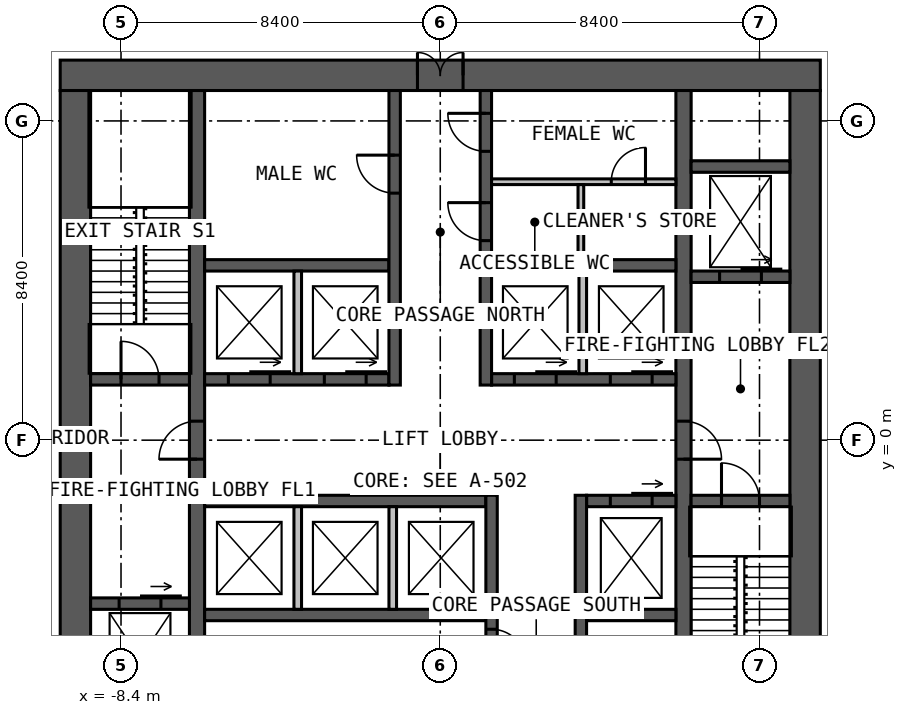
"""IFC4 building model, lengths in metres.
Left out: names, types, materials, properties, quantities, classifications, styles, units other than length and angle.
Written with IfcOpenShell. Run it as: python <this file> out.ifc"""

import sys

from ifc_helpers import new_model, si_unit, direction, frame, frame_2d, origin, place, context, subcontext, project, spatial, rectangle, extrude, element, fill, save


model = new_model("IFC4")
c1 = context("Model", 3, precision=1e-05, world=origin(), true_north=direction((0.0, 1.0)))
c2 = subcontext(c1, "Body", "Model", "MODEL_VIEW")
j1 = project(units=[si_unit("LENGTHUNIT", "METRE"), si_unit("PLANEANGLEUNIT", "RADIAN")], contexts=[c1])
p1 = place(None, origin())
s1 = spatial("IfcSite", under=j1, at=p1, CompositionType="ELEMENT")
p2 = place(p1, origin())
s2 = spatial("IfcBuilding", under=s1, at=p2, CompositionType="ELEMENT")
p3 = place(p2, frame((0.0, 0.0, 33.0)))
s3 = spatial("IfcBuildingStorey", under=s2, at=p3, CompositionType="ELEMENT", Elevation=33.0)
p4 = place(p3, frame((-10.0, 9.6, 0.0), z_axis=(0.0, 0.0, 1.0), x_axis=(1.0, 0.0, 0.0)))
e1 = element("IfcWall", 1, at=p4, inside=s3, PredefinedType="SOLIDWALL", context=c2, shape_type="SweptSolid", body=[
    extrude(rectangle(XDim=20.0, YDim=0.8, at=frame_2d((10.0, 0.0))), origin(), (0.0, 0.0, 1.0), 4.0),
])
p5 = place(p4, frame((9.4, 0.0, 0.0)))
e2 = element("IfcOpeningElement", 2, at=p5, cuts=e1, PredefinedType="OPENING", context=c2, shape_type="SweptSolid", body=[
    extrude(rectangle(XDim=1.2, YDim=2.2, at=frame_2d((0.6, 1.1))), frame((0.0, 0.41, 0.0), z_axis=(0.0, -1.0, 0.0), x_axis=(1.0, 0.0, 0.0)), (0.0, 0.0, 1.0), 0.82),
])
for number, where, z_axis, x_axis in (
    (3, (9.6, -9.2, 0.0), (0.0, 0.0, 1.0), (0.0, 1.0, 0.0)),
    (4, (-9.6, 9.2, 0.0), (0.0, 0.0, 1.0), (0.0, -1.0, 0.0)),
):
    element("IfcWall", number, at=place(p3, frame(where, z_axis=z_axis, x_axis=x_axis)), inside=s3, PredefinedType="SOLIDWALL", context=c2, shape_type="SweptSolid", body=[
        extrude(rectangle(XDim=18.4, YDim=0.8, at=frame_2d((9.2, 0.0))), origin(), (0.0, 0.0, 1.0), 4.0),
    ])
p6 = place(p3, frame((-6.4, -9.2, 0.0), z_axis=(0.0, 0.0, 1.0), x_axis=(0.0, 1.0, 0.0)))
e5 = element("IfcWall", 5, at=p6, inside=s3, PredefinedType="SOLIDWALL", context=c2, shape_type="SweptSolid", body=[
    extrude(rectangle(XDim=18.4, YDim=0.4, at=frame_2d((9.2, 0.0))), origin(), (0.0, 0.0, 1.0), 4.0),
])
p7 = place(p6, frame((8.7, 0.0, 0.0)))
e6 = element("IfcOpeningElement", 6, at=p7, cuts=e5, PredefinedType="OPENING", context=c2, shape_type="SweptSolid", body=[
    extrude(rectangle(XDim=1.0, YDim=2.2, at=frame_2d((0.5, 1.1))), frame((0.0, 0.21, 0.0), z_axis=(0.0, -1.0, 0.0), x_axis=(1.0, 0.0, 0.0)), (0.0, 0.0, 1.0), 0.42),
])
p8 = place(p3, frame((6.4, 9.2, 0.0), z_axis=(0.0, 0.0, 1.0), x_axis=(0.0, -1.0, 0.0)))
e7 = element("IfcWall", 7, at=p8, inside=s3, PredefinedType="SOLIDWALL", context=c2, shape_type="SweptSolid", body=[
    extrude(rectangle(XDim=18.4, YDim=0.4, at=frame_2d((9.2, 0.0))), origin(), (0.0, 0.0, 1.0), 4.0),
])
p9 = place(p8, frame((8.7, 0.0, 0.0)))
e8 = element("IfcOpeningElement", 8, at=p9, cuts=e7, PredefinedType="OPENING", context=c2, shape_type="SweptSolid", body=[
    extrude(rectangle(XDim=1.0, YDim=2.2, at=frame_2d((0.5, 1.1))), frame((0.0, 0.21, 0.0), z_axis=(0.0, -1.0, 0.0), x_axis=(1.0, 0.0, 0.0)), (0.0, 0.0, 1.0), 0.42),
])
p10 = place(p3, frame((-6.2, 1.6, 0.0), z_axis=(0.0, 0.0, 1.0), x_axis=(1.0, 0.0, 0.0)))
e9 = element("IfcWall", 9, at=p10, inside=s3, PredefinedType="SOLIDWALL", context=c2, shape_type="SweptSolid", body=[
    extrude(rectangle(XDim=4.85, YDim=0.3, at=frame_2d((2.425, 0.0))), origin(), (0.0, 0.0, 1.0), 4.0),
])
p11 = place(p10, frame((0.625, 0.0, 0.0)))
e10 = element("IfcOpeningElement", 10, at=p11, cuts=e9, PredefinedType="OPENING", context=c2, shape_type="SweptSolid", body=[
    extrude(rectangle(XDim=1.1, YDim=2.2, at=frame_2d((0.55, 1.1))), frame((0.0, 0.16, 0.0), z_axis=(0.0, -1.0, 0.0), x_axis=(1.0, 0.0, 0.0)), (0.0, 0.0, 1.0), 0.32),
])
p12 = place(p10, frame((3.15, 0.0, 0.0)))
e11 = element("IfcOpeningElement", 11, at=p12, cuts=e9, PredefinedType="OPENING", context=c2, shape_type="SweptSolid", body=[
    extrude(rectangle(XDim=1.1, YDim=2.2, at=frame_2d((0.55, 1.1))), frame((0.0, 0.16, 0.0), z_axis=(0.0, -1.0, 0.0), x_axis=(1.0, 0.0, 0.0)), (0.0, 0.0, 1.0), 0.32),
])
p13 = place(p3, frame((1.35, 1.6, 0.0), z_axis=(0.0, 0.0, 1.0), x_axis=(1.0, 0.0, 0.0)))
e12 = element("IfcWall", 12, at=p13, inside=s3, PredefinedType="SOLIDWALL", context=c2, shape_type="SweptSolid", body=[
    extrude(rectangle(XDim=4.85, YDim=0.3, at=frame_2d((2.425, 0.0))), origin(), (0.0, 0.0, 1.0), 4.0),
])
p14 = place(p13, frame((0.6, 0.0, 0.0)))
e13 = element("IfcOpeningElement", 13, at=p14, cuts=e12, PredefinedType="OPENING", context=c2, shape_type="SweptSolid", body=[
    extrude(rectangle(XDim=1.1, YDim=2.2, at=frame_2d((0.55, 1.1))), frame((0.0, 0.16, 0.0), z_axis=(0.0, -1.0, 0.0), x_axis=(1.0, 0.0, 0.0)), (0.0, 0.0, 1.0), 0.32),
])
p15 = place(p13, frame((3.125, 0.0, 0.0)))
e14 = element("IfcOpeningElement", 14, at=p15, cuts=e12, PredefinedType="OPENING", context=c2, shape_type="SweptSolid", body=[
    extrude(rectangle(XDim=1.1, YDim=2.2, at=frame_2d((0.55, 1.1))), frame((0.0, 0.16, 0.0), z_axis=(0.0, -1.0, 0.0), x_axis=(1.0, 0.0, 0.0)), (0.0, 0.0, 1.0), 0.32),
])
for number, where, z_axis, x_axis in (
    (15, (-6.2, 4.6, 0.0), (0.0, 0.0, 1.0), (1.0, 0.0, 0.0)),
    (16, (1.35, 4.6, 0.0), (0.0, 0.0, 1.0), (1.0, 0.0, 0.0)),
):
    element("IfcWall", number, at=place(p3, frame(where, z_axis=z_axis, x_axis=x_axis)), inside=s3, PredefinedType="SOLIDWALL", context=c2, shape_type="SweptSolid", body=[
        extrude(rectangle(XDim=4.85, YDim=0.3, at=frame_2d((2.425, 0.0))), origin(), (0.0, 0.0, 1.0), 4.0),
    ])
p16 = place(p3, frame((-1.2, 1.45, 0.0), z_axis=(0.0, 0.0, 1.0), x_axis=(0.0, 1.0, 0.0)))
e17 = element("IfcWall", 17, at=p16, inside=s3, PredefinedType="SOLIDWALL", context=c2, shape_type="SweptSolid", body=[
    extrude(rectangle(XDim=7.75, YDim=0.3, at=frame_2d((3.875, 0.0))), origin(), (0.0, 0.0, 1.0), 4.0),
])
p17 = place(p16, frame((5.05, 0.0, 0.0)))
e18 = element("IfcOpeningElement", 18, at=p17, cuts=e17, PredefinedType="OPENING", context=c2, shape_type="SweptSolid", body=[
    extrude(rectangle(XDim=1.0, YDim=2.2, at=frame_2d((0.5, 1.1))), frame((0.0, 0.16, 0.0), z_axis=(0.0, -1.0, 0.0), x_axis=(1.0, 0.0, 0.0)), (0.0, 0.0, 1.0), 0.32),
])
p18 = place(p3, frame((1.2, 1.45, 0.0), z_axis=(0.0, 0.0, 1.0), x_axis=(0.0, 1.0, 0.0)))
e19 = element("IfcWall", 19, at=p18, inside=s3, PredefinedType="SOLIDWALL", context=c2, shape_type="SweptSolid", body=[
    extrude(rectangle(XDim=7.75, YDim=0.3, at=frame_2d((3.875, 0.0))), origin(), (0.0, 0.0, 1.0), 4.0),
])
p19 = place(p18, frame((3.8, 0.0, 0.0)))
e20 = element("IfcOpeningElement", 20, at=p19, cuts=e19, PredefinedType="OPENING", context=c2, shape_type="SweptSolid", body=[
    extrude(rectangle(XDim=1.0, YDim=2.2, at=frame_2d((0.5, 1.1))), frame((0.0, 0.16, 0.0), z_axis=(0.0, -1.0, 0.0), x_axis=(1.0, 0.0, 0.0)), (0.0, 0.0, 1.0), 0.32),
])
p20 = place(p18, frame((6.15, 0.0, 0.0)))
e21 = element("IfcOpeningElement", 21, at=p20, cuts=e19, PredefinedType="OPENING", context=c2, shape_type="SweptSolid", body=[
    extrude(rectangle(XDim=1.0, YDim=2.2, at=frame_2d((0.5, 1.1))), frame((0.0, 0.16, 0.0), z_axis=(0.0, -1.0, 0.0), x_axis=(1.0, 0.0, 0.0)), (0.0, 0.0, 1.0), 0.32),
])
p21 = place(p3, frame((-6.2, -1.6, 0.0), z_axis=(0.0, 0.0, 1.0), x_axis=(1.0, 0.0, 0.0)))
e22 = element("IfcWall", 22, at=p21, inside=s3, PredefinedType="SOLIDWALL", context=c2, shape_type="SweptSolid", body=[
    extrude(rectangle(XDim=7.4, YDim=0.3, at=frame_2d((3.7, 0.0))), origin(), (0.0, 0.0, 1.0), 4.0),
])
p22 = place(p3, frame((3.85, -1.6, 0.0), z_axis=(0.0, 0.0, 1.0), x_axis=(1.0, 0.0, 0.0)))
e23 = element("IfcWall", 23, at=p22, inside=s3, PredefinedType="SOLIDWALL", context=c2, shape_type="SweptSolid", body=[
    extrude(rectangle(XDim=2.35, YDim=0.3, at=frame_2d((1.175, 0.0))), origin(), (0.0, 0.0, 1.0), 4.0),
])
p23 = place(p22, frame((0.625, 0.0, 0.0)))
e24 = element("IfcOpeningElement", 24, at=p23, cuts=e23, PredefinedType="OPENING", context=c2, shape_type="SweptSolid", body=[
    extrude(rectangle(XDim=1.1, YDim=2.2, at=frame_2d((0.55, 1.1))), frame((0.0, 0.16, 0.0), z_axis=(0.0, -1.0, 0.0), x_axis=(1.0, 0.0, 0.0)), (0.0, 0.0, 1.0), 0.32),
])
p24 = place(p3, frame((-6.2, -4.6, 0.0), z_axis=(0.0, 0.0, 1.0), x_axis=(1.0, 0.0, 0.0)))
e25 = element("IfcWall", 25, at=p24, inside=s3, PredefinedType="SOLIDWALL", context=c2, shape_type="SweptSolid", body=[
    extrude(rectangle(XDim=7.4, YDim=0.3, at=frame_2d((3.7, 0.0))), origin(), (0.0, 0.0, 1.0), 4.0),
])
p25 = place(p3, frame((3.85, -4.6, 0.0), z_axis=(0.0, 0.0, 1.0), x_axis=(1.0, 0.0, 0.0)))
e26 = element("IfcWall", 26, at=p25, inside=s3, PredefinedType="SOLIDWALL", context=c2, shape_type="SweptSolid", body=[
    extrude(rectangle(XDim=2.35, YDim=0.3, at=frame_2d((1.175, 0.0))), origin(), (0.0, 0.0, 1.0), 4.0),
])
p26 = place(p3, frame((1.35, -1.45, 0.0), z_axis=(0.0, 0.0, 1.0), x_axis=(0.0, -1.0, 0.0)))
e27 = element("IfcWall", 27, at=p26, inside=s3, PredefinedType="SOLIDWALL", context=c2, shape_type="SweptSolid", body=[
    extrude(rectangle(XDim=7.75, YDim=0.3, at=frame_2d((3.875, 0.0))), origin(), (0.0, 0.0, 1.0), 4.0),
])
p27 = place(p26, frame((5.8, 0.0, 0.0)))
e28 = element("IfcOpeningElement", 28, at=p27, cuts=e27, PredefinedType="OPENING", context=c2, shape_type="SweptSolid", body=[
    extrude(rectangle(XDim=1.0, YDim=2.2, at=frame_2d((0.5, 1.1))), frame((0.0, 0.16, 0.0), z_axis=(0.0, -1.0, 0.0), x_axis=(1.0, 0.0, 0.0)), (0.0, 0.0, 1.0), 0.32),
])
p28 = place(p26, frame((3.525, 0.0, 0.0)))
e29 = element("IfcOpeningElement", 29, at=p28, cuts=e27, PredefinedType="OPENING", context=c2, shape_type="SweptSolid", body=[
    extrude(rectangle(XDim=0.9, YDim=2.2, at=frame_2d((0.45, 1.1))), frame((0.0, 0.16, 0.0), z_axis=(0.0, -1.0, 0.0), x_axis=(1.0, 0.0, 0.0)), (0.0, 0.0, 1.0), 0.32),
])
p29 = place(p3, frame((3.7, -1.45, 0.0), z_axis=(0.0, 0.0, 1.0), x_axis=(0.0, -1.0, 0.0)))
e30 = element("IfcWall", 30, at=p29, inside=s3, PredefinedType="SOLIDWALL", context=c2, shape_type="SweptSolid", body=[
    extrude(rectangle(XDim=7.75, YDim=0.3, at=frame_2d((3.875, 0.0))), origin(), (0.0, 0.0, 1.0), 4.0),
])
p30 = place(p29, frame((5.1, 0.0, 0.0)))
e31 = element("IfcOpeningElement", 31, at=p30, cuts=e30, PredefinedType="OPENING", context=c2, shape_type="SweptSolid", body=[
    extrude(rectangle(XDim=0.9, YDim=2.2, at=frame_2d((0.45, 1.1))), frame((0.0, 0.16, 0.0), z_axis=(0.0, -1.0, 0.0), x_axis=(1.0, 0.0, 0.0)), (0.0, 0.0, 1.0), 0.32),
])
p31 = place(p3, frame((-9.2, 1.6, 0.0), z_axis=(0.0, 0.0, 1.0), x_axis=(1.0, 0.0, 0.0)))
e32 = element("IfcWall", 32, at=p31, inside=s3, PredefinedType="SOLIDWALL", context=c2, shape_type="SweptSolid", body=[
    extrude(rectangle(XDim=2.6, YDim=0.3, at=frame_2d((1.3, 0.0))), origin(), (0.0, 0.0, 1.0), 4.0),
])
p32 = place(p31, frame((0.8, 0.0, 0.0)))
e33 = element("IfcOpeningElement", 33, at=p32, cuts=e32, PredefinedType="OPENING", context=c2, shape_type="SweptSolid", body=[
    extrude(rectangle(XDim=1.0, YDim=2.2, at=frame_2d((0.5, 1.1))), frame((0.0, 0.16, 0.0), z_axis=(0.0, -1.0, 0.0), x_axis=(1.0, 0.0, 0.0)), (0.0, 0.0, 1.0), 0.32),
])
p33 = place(p3, frame((6.6, -1.6, 0.0), z_axis=(0.0, 0.0, 1.0), x_axis=(1.0, 0.0, 0.0)))
e34 = element("IfcWall", 34, at=p33, inside=s3, PredefinedType="SOLIDWALL", context=c2, shape_type="SweptSolid", body=[
    extrude(rectangle(XDim=2.6, YDim=0.3, at=frame_2d((1.3, 0.0))), origin(), (0.0, 0.0, 1.0), 4.0),
])
p34 = place(p33, frame((0.8, 0.0, 0.0)))
e35 = element("IfcOpeningElement", 35, at=p34, cuts=e34, PredefinedType="OPENING", context=c2, shape_type="SweptSolid", body=[
    extrude(rectangle(XDim=1.0, YDim=2.2, at=frame_2d((0.5, 1.1))), frame((0.0, 0.16, 0.0), z_axis=(0.0, -1.0, 0.0), x_axis=(1.0, 0.0, 0.0)), (0.0, 0.0, 1.0), 0.32),
])
p35 = place(p3, frame((-9.2, -4.3, 0.0), z_axis=(0.0, 0.0, 1.0), x_axis=(1.0, 0.0, 0.0)))
e36 = element("IfcWall", 36, at=p35, inside=s3, PredefinedType="SOLIDWALL", context=c2, shape_type="SweptSolid", body=[
    extrude(rectangle(XDim=2.6, YDim=0.3, at=frame_2d((1.3, 0.0))), origin(), (0.0, 0.0, 1.0), 4.0),
])
p36 = place(p35, frame((0.75, 0.0, 0.0)))
e37 = element("IfcOpeningElement", 37, at=p36, cuts=e36, PredefinedType="OPENING", context=c2, shape_type="SweptSolid", body=[
    extrude(rectangle(XDim=1.1, YDim=2.2, at=frame_2d((0.55, 1.1))), frame((0.0, 0.16, 0.0), z_axis=(0.0, -1.0, 0.0), x_axis=(1.0, 0.0, 0.0)), (0.0, 0.0, 1.0), 0.32),
])
p37 = place(p3, frame((6.6, 4.3, 0.0), z_axis=(0.0, 0.0, 1.0), x_axis=(1.0, 0.0, 0.0)))
e38 = element("IfcWall", 38, at=p37, inside=s3, PredefinedType="SOLIDWALL", context=c2, shape_type="SweptSolid", body=[
    extrude(rectangle(XDim=2.6, YDim=0.3, at=frame_2d((1.3, 0.0))), origin(), (0.0, 0.0, 1.0), 4.0),
])
p38 = place(p37, frame((0.75, 0.0, 0.0)))
e39 = element("IfcOpeningElement", 39, at=p38, cuts=e38, PredefinedType="OPENING", context=c2, shape_type="SweptSolid", body=[
    extrude(rectangle(XDim=1.1, YDim=2.2, at=frame_2d((0.55, 1.1))), frame((0.0, 0.16, 0.0), z_axis=(0.0, -1.0, 0.0), x_axis=(1.0, 0.0, 0.0)), (0.0, 0.0, 1.0), 0.32),
])
p39 = place(p3, frame((6.6, 7.2, 0.0), z_axis=(0.0, 0.0, 1.0), x_axis=(1.0, 0.0, 0.0)))
e40 = element("IfcWall", 40, at=p39, inside=s3, PredefinedType="SOLIDWALL", context=c2, shape_type="SweptSolid", body=[
    extrude(rectangle(XDim=2.6, YDim=0.3, at=frame_2d((1.3, 0.0))), origin(), (0.0, 0.0, 1.0), 4.0),
])
for number, where, z_axis, x_axis in (
    (41, (-3.75, 1.75, 0.0), (0.0, 0.0, 1.0), (0.0, 1.0, 0.0)),
    (42, (3.75, 1.75, 0.0), (0.0, 0.0, 1.0), (0.0, 1.0, 0.0)),
    (43, (-3.75, -1.75, 0.0), (0.0, 0.0, 1.0), (0.0, -1.0, 0.0)),
    (44, (-1.25, -1.75, 0.0), (0.0, 0.0, 1.0), (0.0, -1.0, 0.0)),
):
    element("IfcWall", number, at=place(p3, frame(where, z_axis=z_axis, x_axis=x_axis)), inside=s3, PredefinedType="SOLIDWALL", context=c2, shape_type="SweptSolid", body=[
        extrude(rectangle(XDim=2.7, YDim=0.2, at=frame_2d((1.35, 0.0))), origin(), (0.0, 0.0, 1.0), 3.75),
    ])
p40 = place(p3, frame((1.35, 6.8, 0.0), z_axis=(0.0, 0.0, 1.0), x_axis=(1.0, 0.0, 0.0)))
e45 = element("IfcWall", 45, at=p40, inside=s3, PredefinedType="PARTITIONING", context=c2, shape_type="SweptSolid", body=[
    extrude(rectangle(XDim=4.85, YDim=0.15, at=frame_2d((2.425, 0.0))), origin(), (0.0, 0.0, 1.0), 3.75),
])
p41 = place(p40, frame((3.15, 0.0, 0.0)))
e46 = element("IfcOpeningElement", 46, at=p41, cuts=e45, PredefinedType="OPENING", context=c2, shape_type="SweptSolid", body=[
    extrude(rectangle(XDim=0.9, YDim=2.2, at=frame_2d((0.45, 1.1))), frame((0.0, 0.085, 0.0), z_axis=(0.0, -1.0, 0.0), x_axis=(1.0, 0.0, 0.0)), (0.0, 0.0, 1.0), 0.17),
])
p42 = place(p3, frame((3.7, 4.75, 0.0), z_axis=(0.0, 0.0, 1.0), x_axis=(0.0, 1.0, 0.0)))
e47 = element("IfcWall", 47, at=p42, inside=s3, PredefinedType="PARTITIONING", context=c2, shape_type="SweptSolid", body=[
    extrude(rectangle(XDim=1.975, YDim=0.15, at=frame_2d((0.988, 0.0))), origin(), (0.0, 0.0, 1.0), 3.75),
])
p43 = place(p5, origin())
e48 = element("IfcDoor", 48, at=p43, inside=s3, OperationType="DOUBLE_DOOR_SINGLE_SWING", PredefinedType="DOOR", context=c2, shape_type="SweptSolid", body=[
    extrude(rectangle(XDim=1.2, YDim=2.2, at=frame_2d((0.6, 1.1))), frame((0.0, 0.025, 0.0), z_axis=(0.0, -1.0, 0.0), x_axis=(1.0, 0.0, 0.0)), (0.0, 0.0, 1.0), 0.05),
])
fill(e2, e48)
p44 = place(p7, origin())
e49 = element("IfcDoor", 49, at=p44, inside=s3, OperationType="SINGLE_SWING_LEFT", PredefinedType="DOOR", context=c2, shape_type="SweptSolid", body=[
    extrude(rectangle(XDim=1.0, YDim=2.2, at=frame_2d((0.5, 1.1))), frame((0.0, 0.025, 0.0), z_axis=(0.0, -1.0, 0.0), x_axis=(1.0, 0.0, 0.0)), (0.0, 0.0, 1.0), 0.05),
])
fill(e6, e49)
p45 = place(p9, origin())
e50 = element("IfcDoor", 50, at=p45, inside=s3, OperationType="SINGLE_SWING_RIGHT", PredefinedType="DOOR", context=c2, shape_type="SweptSolid", body=[
    extrude(rectangle(XDim=1.0, YDim=2.2, at=frame_2d((0.5, 1.1))), frame((0.0, 0.025, 0.0), z_axis=(0.0, -1.0, 0.0), x_axis=(1.0, 0.0, 0.0)), (0.0, 0.0, 1.0), 0.05),
])
fill(e8, e50)
p46 = place(p32, origin())
e51 = element("IfcDoor", 51, at=p46, inside=s3, OperationType="SINGLE_SWING_LEFT", PredefinedType="DOOR", context=c2, shape_type="SweptSolid", body=[
    extrude(rectangle(XDim=1.0, YDim=2.2, at=frame_2d((0.5, 1.1))), frame((0.0, 0.025, 0.0), z_axis=(0.0, -1.0, 0.0), x_axis=(1.0, 0.0, 0.0)), (0.0, 0.0, 1.0), 0.05),
])
fill(e33, e51)
p47 = place(p34, origin())
e52 = element("IfcDoor", 52, at=p47, inside=s3, OperationType="SINGLE_SWING_LEFT", PredefinedType="DOOR", context=c2, shape_type="SweptSolid", body=[
    extrude(rectangle(XDim=1.0, YDim=2.2, at=frame_2d((0.5, 1.1))), frame((0.0, 0.025, 0.0), z_axis=(0.0, -1.0, 0.0), x_axis=(1.0, 0.0, 0.0)), (0.0, 0.0, 1.0), 0.05),
])
fill(e35, e52)
p48 = place(p17, origin())
e53 = element("IfcDoor", 53, at=p48, inside=s3, OperationType="SINGLE_SWING_RIGHT", PredefinedType="DOOR", context=c2, shape_type="SweptSolid", body=[
    extrude(rectangle(XDim=1.0, YDim=2.2, at=frame_2d((0.5, 1.1))), frame((0.0, 0.025, 0.0), z_axis=(0.0, -1.0, 0.0), x_axis=(1.0, 0.0, 0.0)), (0.0, 0.0, 1.0), 0.05),
])
fill(e18, e53)
p49 = place(p19, origin())
e54 = element("IfcDoor", 54, at=p49, inside=s3, OperationType="SINGLE_SWING_RIGHT", PredefinedType="DOOR", context=c2, shape_type="SweptSolid", body=[
    extrude(rectangle(XDim=1.0, YDim=2.2, at=frame_2d((0.5, 1.1))), frame((0.0, 0.025, 0.0), z_axis=(0.0, -1.0, 0.0), x_axis=(1.0, 0.0, 0.0)), (0.0, 0.0, 1.0), 0.05),
])
fill(e20, e54)
p50 = place(p20, origin())
e55 = element("IfcDoor", 55, at=p50, inside=s3, OperationType="SINGLE_SWING_RIGHT", PredefinedType="DOOR", context=c2, shape_type="SweptSolid", body=[
    extrude(rectangle(XDim=1.0, YDim=2.2, at=frame_2d((0.5, 1.1))), frame((0.0, 0.025, 0.0), z_axis=(0.0, -1.0, 0.0), x_axis=(1.0, 0.0, 0.0)), (0.0, 0.0, 1.0), 0.05),
])
fill(e21, e55)
p51 = place(p28, origin())
e56 = element("IfcDoor", 56, at=p51, inside=s3, OperationType="SINGLE_SWING_RIGHT", PredefinedType="DOOR", context=c2, shape_type="SweptSolid", body=[
    extrude(rectangle(XDim=0.9, YDim=2.2, at=frame_2d((0.45, 1.1))), frame((0.0, 0.025, 0.0), z_axis=(0.0, -1.0, 0.0), x_axis=(1.0, 0.0, 0.0)), (0.0, 0.0, 1.0), 0.05),
])
fill(e29, e56)
p52 = place(p41, origin())
e57 = element("IfcDoor", 57, at=p52, inside=s3, OperationType="SINGLE_SWING_RIGHT", PredefinedType="DOOR", context=c2, shape_type="SweptSolid", body=[
    extrude(rectangle(XDim=0.9, YDim=2.2, at=frame_2d((0.45, 1.1))), frame((0.0, 0.025, 0.0), z_axis=(0.0, -1.0, 0.0), x_axis=(1.0, 0.0, 0.0)), (0.0, 0.0, 1.0), 0.05),
])
fill(e46, e57)
p53 = place(p11, origin())
e58 = element("IfcDoor", 58, at=p53, inside=s3, OperationType="SLIDING_TO_LEFT", PredefinedType="DOOR", context=c2, shape_type="SweptSolid", body=[
    extrude(rectangle(XDim=1.1, YDim=2.2, at=frame_2d((0.55, 1.1))), frame((0.0, 0.025, 0.0), z_axis=(0.0, -1.0, 0.0), x_axis=(1.0, 0.0, 0.0)), (0.0, 0.0, 1.0), 0.05),
])
fill(e10, e58)
p54 = place(p12, origin())
e59 = element("IfcDoor", 59, at=p54, inside=s3, OperationType="SLIDING_TO_LEFT", PredefinedType="DOOR", context=c2, shape_type="SweptSolid", body=[
    extrude(rectangle(XDim=1.1, YDim=2.2, at=frame_2d((0.55, 1.1))), frame((0.0, 0.025, 0.0), z_axis=(0.0, -1.0, 0.0), x_axis=(1.0, 0.0, 0.0)), (0.0, 0.0, 1.0), 0.05),
])
fill(e11, e59)
p55 = place(p14, origin())
e60 = element("IfcDoor", 60, at=p55, inside=s3, OperationType="SLIDING_TO_LEFT", PredefinedType="DOOR", context=c2, shape_type="SweptSolid", body=[
    extrude(rectangle(XDim=1.1, YDim=2.2, at=frame_2d((0.55, 1.1))), frame((0.0, 0.025, 0.0), z_axis=(0.0, -1.0, 0.0), x_axis=(1.0, 0.0, 0.0)), (0.0, 0.0, 1.0), 0.05),
])
fill(e13, e60)
p56 = place(p15, origin())
e61 = element("IfcDoor", 61, at=p56, inside=s3, OperationType="SLIDING_TO_LEFT", PredefinedType="DOOR", context=c2, shape_type="SweptSolid", body=[
    extrude(rectangle(XDim=1.1, YDim=2.2, at=frame_2d((0.55, 1.1))), frame((0.0, 0.025, 0.0), z_axis=(0.0, -1.0, 0.0), x_axis=(1.0, 0.0, 0.0)), (0.0, 0.0, 1.0), 0.05),
])
fill(e14, e61)
p57 = place(p23, origin())
e62 = element("IfcDoor", 62, at=p57, inside=s3, OperationType="SLIDING_TO_LEFT", PredefinedType="DOOR", context=c2, shape_type="SweptSolid", body=[
    extrude(rectangle(XDim=1.1, YDim=2.2, at=frame_2d((0.55, 1.1))), frame((0.0, 0.025, 0.0), z_axis=(0.0, -1.0, 0.0), x_axis=(1.0, 0.0, 0.0)), (0.0, 0.0, 1.0), 0.05),
])
fill(e24, e62)
p58 = place(p36, origin())
e63 = element("IfcDoor", 63, at=p58, inside=s3, OperationType="SLIDING_TO_LEFT", PredefinedType="DOOR", context=c2, shape_type="SweptSolid", body=[
    extrude(rectangle(XDim=1.1, YDim=2.2, at=frame_2d((0.55, 1.1))), frame((0.0, 0.025, 0.0), z_axis=(0.0, -1.0, 0.0), x_axis=(1.0, 0.0, 0.0)), (0.0, 0.0, 1.0), 0.05),
])
fill(e37, e63)
p59 = place(p38, origin())
e64 = element("IfcDoor", 64, at=p59, inside=s3, OperationType="SLIDING_TO_LEFT", PredefinedType="DOOR", context=c2, shape_type="SweptSolid", body=[
    extrude(rectangle(XDim=1.1, YDim=2.2, at=frame_2d((0.55, 1.1))), frame((0.0, 0.025, 0.0), z_axis=(0.0, -1.0, 0.0), x_axis=(1.0, 0.0, 0.0)), (0.0, 0.0, 1.0), 0.05),
])
fill(e39, e64)
save(model, sys.argv[1])
